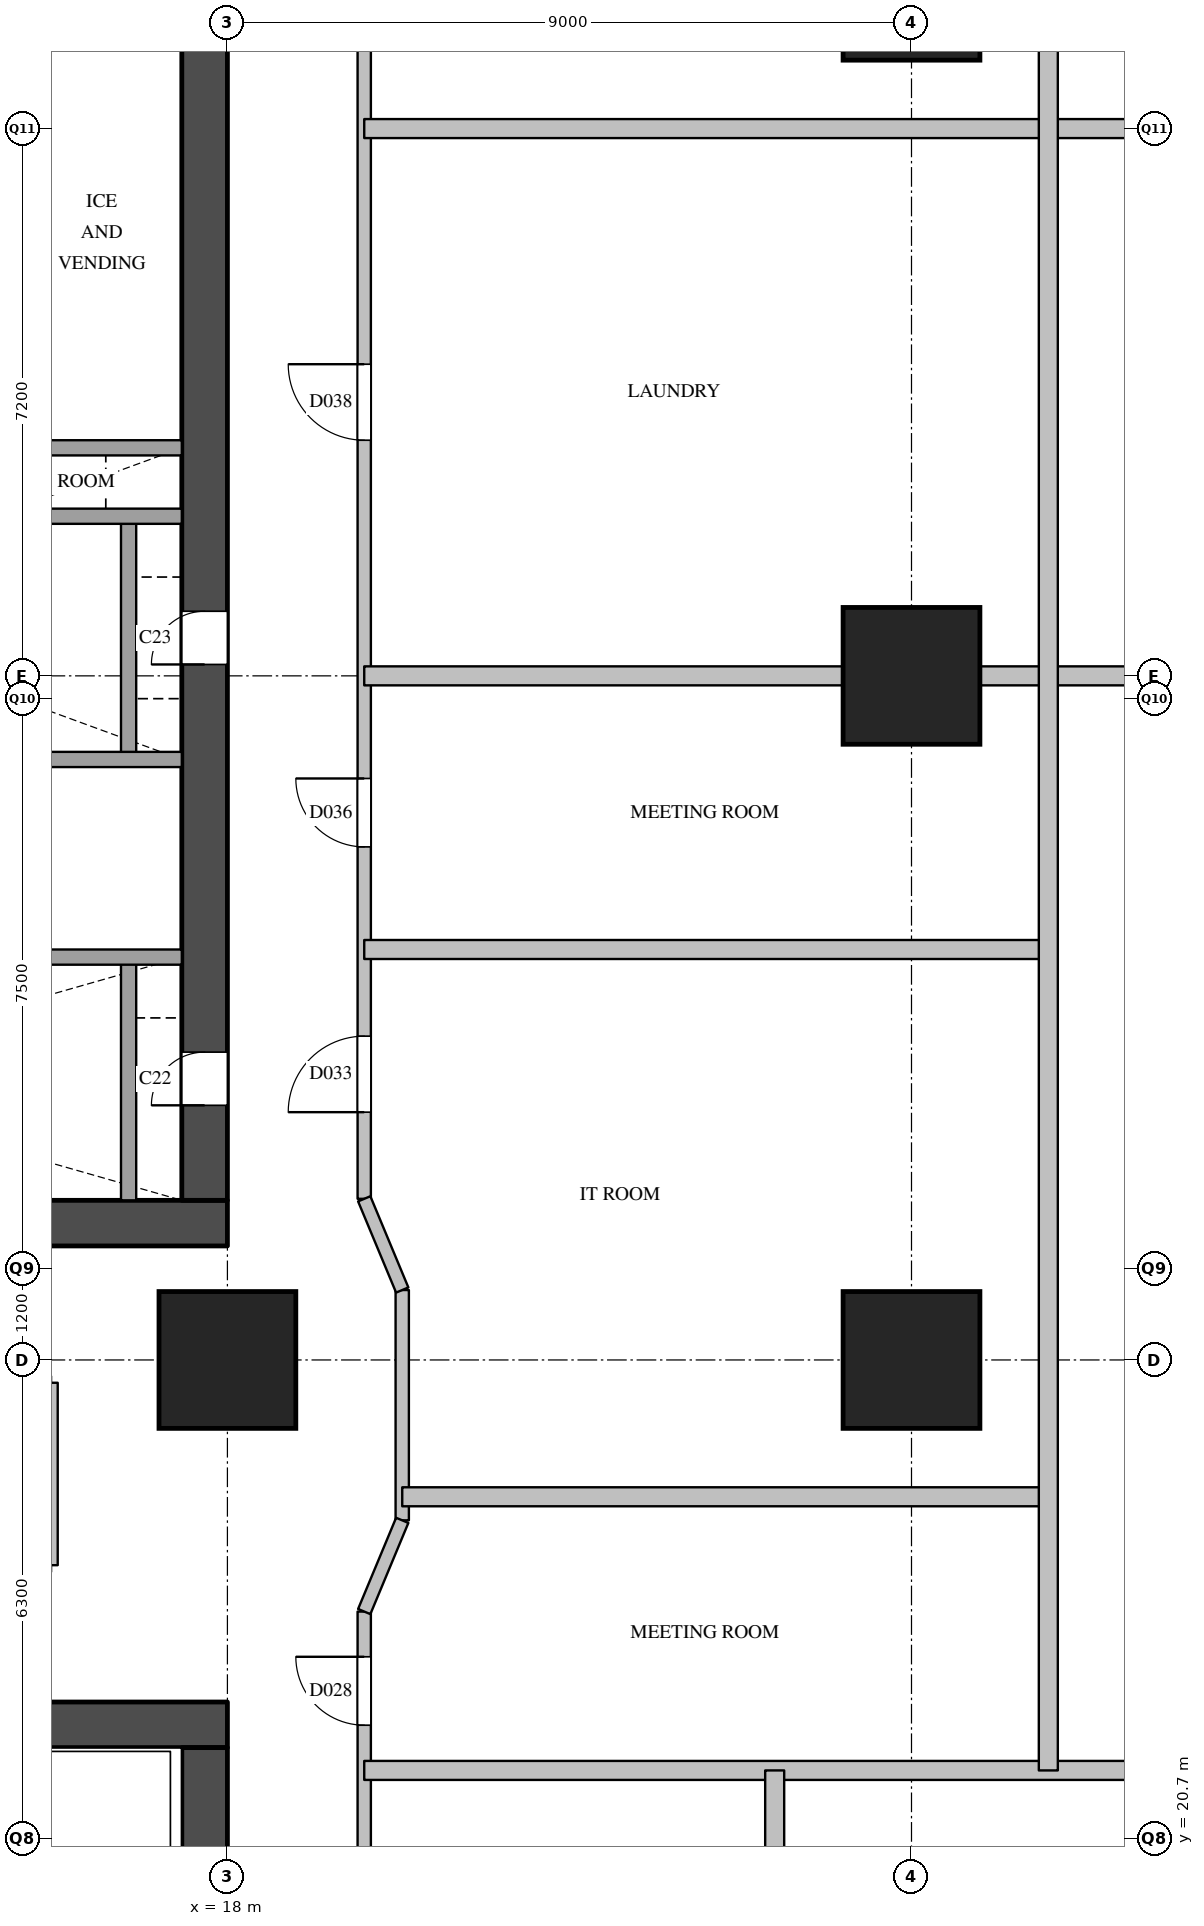
"""IFC4 building model, lengths in metres.
Left out: names, types, materials, properties, quantities, classifications, styles, units other than length and angle.
Written with IfcOpenShell. Run it as: python <this file> out.ifc"""

import sys

from ifc_helpers import new_model, si_unit, direction, frame, frame_2d, origin, origin_2d, place, context, subcontext, project, spatial, rectangle, extrude, element, fill, save


model = new_model("IFC4")
c1 = context("Model", 3, precision=1e-05, world=origin(), true_north=direction((0.0, 1.0)))
c2 = subcontext(c1, "Body", "Model", "MODEL_VIEW")
j1 = project(units=[si_unit("LENGTHUNIT", "METRE"), si_unit("PLANEANGLEUNIT", "RADIAN")], contexts=[c1])
p1 = place(None, origin())
s1 = spatial("IfcSite", under=j1, at=p1, CompositionType="ELEMENT")
p2 = place(p1, origin())
s2 = spatial("IfcBuilding", under=s1, at=p2, CompositionType="ELEMENT")
p3 = place(p2, frame((0.0, 0.0, 57.6)))
s3 = spatial("IfcBuildingStorey", under=s2, at=p3, CompositionType="ELEMENT", Elevation=57.6)
for number, where, z_axis, x_axis in (
    (1, (18.0, 27.0, 0.0), (0.0, 0.0, 1.0), (1.0, 0.0, 0.0)),
    (2, (27.0, 27.0, 0.0), (0.0, 0.0, 1.0), (1.0, 0.0, 0.0)),
    (3, (27.0, 36.0, 0.0), (0.0, 0.0, 1.0), (1.0, 0.0, 0.0)),
    (4, (27.0, 45.0, 0.0), (0.0, 0.0, 1.0), (1.0, 0.0, 0.0)),
):
    element("IfcColumn", number, at=place(p3, frame(where, z_axis=z_axis, x_axis=x_axis)), inside=s3, PredefinedType="COLUMN", context=c2, shape_type="SweptSolid", body=[
        extrude(rectangle(XDim=1.8, YDim=1.8, at=origin_2d()), origin(), (0.0, 0.0, 1.0), 3.8),
    ])
p4 = place(p3, frame((5.6, 28.8, 0.0), z_axis=(0.0, 0.0, 1.0), x_axis=(1.0, 0.0, 0.0)))
e5 = element("IfcWall", 5, at=p4, inside=s3, PredefinedType="SHEAR", context=c2, shape_type="SweptSolid", body=[
    extrude(rectangle(XDim=12.4, YDim=0.6, at=frame_2d((6.2, 0.0))), origin(), (0.0, 0.0, 1.0), 3.5),
])
p5 = place(p4, frame((1.05, 0.0, 0.0)))
e6 = element("IfcOpeningElement", 6, at=p5, cuts=e5, PredefinedType="OPENING", context=c2, shape_type="SweptSolid", body=[
    extrude(rectangle(XDim=1.2, YDim=2.1, at=frame_2d((0.6, 1.05))), frame((0.0, 0.31, 0.0), z_axis=(0.0, -1.0, 0.0), x_axis=(1.0, 0.0, 0.0)), (0.0, 0.0, 1.0), 0.62),
])
p6 = place(p4, frame((5.25, 0.0, 0.0)))
e7 = element("IfcOpeningElement", 7, at=p6, cuts=e5, PredefinedType="OPENING", context=c2, shape_type="SweptSolid", body=[
    extrude(rectangle(XDim=1.2, YDim=2.1, at=frame_2d((0.6, 1.05))), frame((0.0, 0.31, 0.0), z_axis=(0.0, -1.0, 0.0), x_axis=(1.0, 0.0, 0.0)), (0.0, 0.0, 1.0), 0.62),
])
p7 = place(p4, frame((7.35, 0.0, 0.0)))
e8 = element("IfcOpeningElement", 8, at=p7, cuts=e5, PredefinedType="OPENING", context=c2, shape_type="SweptSolid", body=[
    extrude(rectangle(XDim=1.2, YDim=2.1, at=frame_2d((0.6, 1.05))), frame((0.0, 0.31, 0.0), z_axis=(0.0, -1.0, 0.0), x_axis=(1.0, 0.0, 0.0)), (0.0, 0.0, 1.0), 0.62),
])
p8 = place(p3, frame((17.7, 29.1, 0.0), z_axis=(0.0, 0.0, 1.0), x_axis=(0.0, 1.0, 0.0)))
e9 = element("IfcWall", 9, at=p8, inside=s3, PredefinedType="SHEAR", context=c2, shape_type="SweptSolid", body=[
    extrude(rectangle(XDim=20.3, YDim=0.6, at=frame_2d((10.15, 0.0))), origin(), (0.0, 0.0, 1.0), 3.5),
])
p9 = place(p8, frame((1.25, 0.0, 0.0)))
e10 = element("IfcOpeningElement", 10, at=p9, cuts=e9, PredefinedType="OPENING", context=c2, shape_type="SweptSolid", body=[
    extrude(rectangle(XDim=0.7, YDim=2.1, at=frame_2d((0.35, 1.05))), frame((0.0, 0.31, 0.0), z_axis=(0.0, -1.0, 0.0), x_axis=(1.0, 0.0, 0.0)), (0.0, 0.0, 1.0), 0.62),
])
p10 = place(p8, frame((7.05, 0.0, 0.0)))
e11 = element("IfcOpeningElement", 11, at=p10, cuts=e9, PredefinedType="OPENING", context=c2, shape_type="SweptSolid", body=[
    extrude(rectangle(XDim=0.7, YDim=2.1, at=frame_2d((0.35, 1.05))), frame((0.0, 0.31, 0.0), z_axis=(0.0, -1.0, 0.0), x_axis=(1.0, 0.0, 0.0)), (0.0, 0.0, 1.0), 0.62),
])
p11 = place(p3, frame((16.7, 29.1, 0.0), z_axis=(0.0, 0.0, 1.0), x_axis=(0.0, 1.0, 0.0)))
e12 = element("IfcWall", 12, at=p11, inside=s3, PredefinedType="SOLIDWALL", context=c2, shape_type="SweptSolid", body=[
    extrude(rectangle(XDim=3.2, YDim=0.2, at=frame_2d((1.6, 0.0))), origin(), (0.0, 0.0, 1.0), 3.5),
])
p12 = place(p3, frame((16.7, 34.9, 0.0), z_axis=(0.0, 0.0, 1.0), x_axis=(0.0, 1.0, 0.0)))
e13 = element("IfcWall", 13, at=p12, inside=s3, PredefinedType="SOLIDWALL", context=c2, shape_type="SweptSolid", body=[
    extrude(rectangle(XDim=3.2, YDim=0.2, at=frame_2d((1.6, 0.0))), origin(), (0.0, 0.0, 1.0), 3.5),
])
p13 = place(p3, frame((6.2, 32.3, 0.0), z_axis=(0.0, 0.0, 1.0), x_axis=(1.0, 0.0, 0.0)))
e14 = element("IfcWall", 14, at=p13, inside=s3, PredefinedType="SOLIDWALL", context=c2, shape_type="SweptSolid", body=[
    extrude(rectangle(XDim=11.2, YDim=0.2, at=frame_2d((5.6, 0.0))), origin(), (0.0, 0.0, 1.0), 3.5),
])
p14 = place(p13, frame((2.55, 0.0, 0.0)))
e15 = element("IfcOpeningElement", 15, at=p14, cuts=e14, PredefinedType="OPENING", context=c2, shape_type="SweptSolid", body=[
    extrude(rectangle(XDim=1.2, YDim=2.1, at=frame_2d((0.6, 1.05))), frame((0.0, 0.11, 0.0), z_axis=(0.0, -1.0, 0.0), x_axis=(1.0, 0.0, 0.0)), (0.0, 0.0, 1.0), 0.22),
])
p15 = place(p3, frame((6.2, 34.9, 0.0), z_axis=(0.0, 0.0, 1.0), x_axis=(1.0, 0.0, 0.0)))
e16 = element("IfcWall", 16, at=p15, inside=s3, PredefinedType="SOLIDWALL", context=c2, shape_type="SweptSolid", body=[
    extrude(rectangle(XDim=11.2, YDim=0.2, at=frame_2d((5.6, 0.0))), origin(), (0.0, 0.0, 1.0), 3.5),
])
p16 = place(p3, frame((6.2, 38.1, 0.0), z_axis=(0.0, 0.0, 1.0), x_axis=(1.0, 0.0, 0.0)))
e17 = element("IfcWall", 17, at=p16, inside=s3, PredefinedType="SOLIDWALL", context=c2, shape_type="SweptSolid", body=[
    extrude(rectangle(XDim=11.2, YDim=0.2, at=frame_2d((5.6, 0.0))), origin(), (0.0, 0.0, 1.0), 3.5),
])
p17 = place(p16, frame((0.45, 0.0, 0.0)))
e18 = element("IfcOpeningElement", 18, at=p17, cuts=e17, PredefinedType="OPENING", context=c2, shape_type="SweptSolid", body=[
    extrude(rectangle(XDim=1.2, YDim=2.1, at=frame_2d((0.6, 1.05))), frame((0.0, 0.11, 0.0), z_axis=(0.0, -1.0, 0.0), x_axis=(1.0, 0.0, 0.0)), (0.0, 0.0, 1.0), 0.22),
])
p18 = place(p16, frame((2.55, 0.0, 0.0)))
e19 = element("IfcOpeningElement", 19, at=p18, cuts=e17, PredefinedType="OPENING", context=c2, shape_type="SweptSolid", body=[
    extrude(rectangle(XDim=1.2, YDim=2.1, at=frame_2d((0.6, 1.05))), frame((0.0, 0.11, 0.0), z_axis=(0.0, -1.0, 0.0), x_axis=(1.0, 0.0, 0.0)), (0.0, 0.0, 1.0), 0.22),
])
p19 = place(p16, frame((4.65, 0.0, 0.0)))
e20 = element("IfcOpeningElement", 20, at=p19, cuts=e17, PredefinedType="OPENING", context=c2, shape_type="SweptSolid", body=[
    extrude(rectangle(XDim=1.2, YDim=2.1, at=frame_2d((0.6, 1.05))), frame((0.0, 0.11, 0.0), z_axis=(0.0, -1.0, 0.0), x_axis=(1.0, 0.0, 0.0)), (0.0, 0.0, 1.0), 0.22),
])
p20 = place(p16, frame((6.75, 0.0, 0.0)))
e21 = element("IfcOpeningElement", 21, at=p20, cuts=e17, PredefinedType="OPENING", context=c2, shape_type="SweptSolid", body=[
    extrude(rectangle(XDim=1.2, YDim=2.1, at=frame_2d((0.6, 1.05))), frame((0.0, 0.11, 0.0), z_axis=(0.0, -1.0, 0.0), x_axis=(1.0, 0.0, 0.0)), (0.0, 0.0, 1.0), 0.22),
])
p21 = place(p3, frame((12.5, 39.0, 0.0), z_axis=(0.0, 0.0, 1.0), x_axis=(1.0, 0.0, 0.0)))
e22 = element("IfcWall", 22, at=p21, inside=s3, PredefinedType="SOLIDWALL", context=c2, shape_type="SweptSolid", body=[
    extrude(rectangle(XDim=4.9, YDim=0.2, at=frame_2d((2.45, 0.0))), origin(), (0.0, 0.0, 1.0), 3.5),
])
p22 = place(p3, frame((9.0, 22.2, 0.0), z_axis=(0.0, 0.0, 1.0), x_axis=(1.0, 0.0, 0.0)))
e23 = element("IfcWall", 23, at=p22, inside=s3, PredefinedType="SHEAR", context=c2, shape_type="SweptSolid", body=[
    extrude(rectangle(XDim=9.0, YDim=0.6, at=frame_2d((4.5, 0.0))), origin(), (0.0, 0.0, 1.0), 3.5),
])
p23 = place(p3, frame((17.7, 9.6, 0.0), z_axis=(0.0, 0.0, 1.0), x_axis=(0.0, 1.0, 0.0)))
e24 = element("IfcWall", 24, at=p23, inside=s3, PredefinedType="SHEAR", context=c2, shape_type="SweptSolid", body=[
    extrude(rectangle(XDim=12.3, YDim=0.6, at=frame_2d((6.15, 0.0))), origin(), (0.0, 0.0, 1.0), 3.5),
])
p24 = place(p23, frame((0.525, 0.0, 0.0)))
e25 = element("IfcOpeningElement", 25, at=p24, cuts=e24, PredefinedType="OPENING", context=c2, shape_type="SweptSolid", body=[
    extrude(rectangle(XDim=1.2, YDim=2.1, at=frame_2d((0.6, 1.05))), frame((0.0, 0.31, 0.0), z_axis=(0.0, -1.0, 0.0), x_axis=(1.0, 0.0, 0.0)), (0.0, 0.0, 1.0), 0.62),
])
p25 = place(p3, frame((15.68, 24.3, 0.0), z_axis=(0.0, 0.0, 1.0), x_axis=(0.0, 1.0, 0.0)))
e26 = element("IfcWall", 26, at=p25, inside=s3, PredefinedType="PARTITIONING", context=c2, shape_type="SweptSolid", body=[
    extrude(rectangle(XDim=2.4, YDim=0.175, at=frame_2d((1.2, 0.0))), origin(), (0.0, 0.0, 1.0), 2.5),
])
p26 = place(p3, frame((19.8, 7.2, 0.0), z_axis=(0.0, 0.0, 1.0), x_axis=(0.0, 1.0, 0.0)))
e27 = element("IfcWall", 27, at=p26, inside=s3, PredefinedType="PARTITIONING", context=c2, shape_type="SweptSolid", body=[
    extrude(rectangle(XDim=16.49, YDim=0.175, at=frame_2d((8.245, 0.0))), origin(), (0.0, 0.0, 1.0), 3.5),
])
p27 = place(p26, frame((1.35, 0.0, 0.0)))
e28 = element("IfcOpeningElement", 28, at=p27, cuts=e27, PredefinedType="OPENING", context=c2, shape_type="SweptSolid", body=[
    extrude(rectangle(XDim=0.9, YDim=2.1, at=frame_2d((0.45, 1.05))), frame((0.0, 0.097, 0.0), z_axis=(0.0, -1.0, 0.0), x_axis=(1.0, 0.0, 0.0)), (0.0, 0.0, 1.0), 0.195),
])
p28 = place(p26, frame((8.5, 0.0, 0.0)))
e29 = element("IfcOpeningElement", 29, at=p28, cuts=e27, PredefinedType="OPENING", context=c2, shape_type="SweptSolid", body=[
    extrude(rectangle(XDim=1.0, YDim=2.1, at=frame_2d((0.5, 1.05))), frame((0.0, 0.097, 0.0), z_axis=(0.0, -1.0, 0.0), x_axis=(1.0, 0.0, 0.0)), (0.0, 0.0, 1.0), 0.195),
])
p29 = place(p26, frame((14.995, 0.0, 0.0)))
e30 = element("IfcOpeningElement", 30, at=p29, cuts=e27, PredefinedType="OPENING", context=c2, shape_type="SweptSolid", body=[
    extrude(rectangle(XDim=0.9, YDim=2.1, at=frame_2d((0.45, 1.05))), frame((0.0, 0.097, 0.0), z_axis=(0.0, -1.0, 0.0), x_axis=(1.0, 0.0, 0.0)), (0.0, 0.0, 1.0), 0.195),
])
p30 = place(p3, frame((19.8, 29.12, 0.0), z_axis=(0.0, 0.0, 1.0), x_axis=(0.0, 1.0, 0.0)))
e31 = element("IfcWall", 31, at=p30, inside=s3, PredefinedType="PARTITIONING", context=c2, shape_type="SweptSolid", body=[
    extrude(rectangle(XDim=22.68, YDim=0.175, at=frame_2d((11.34, 0.0))), origin(), (0.0, 0.0, 1.0), 3.5),
])
p31 = place(p30, frame((1.14, 0.0, 0.0)))
e32 = element("IfcOpeningElement", 32, at=p31, cuts=e31, PredefinedType="OPENING", context=c2, shape_type="SweptSolid", body=[
    extrude(rectangle(XDim=1.0, YDim=2.1, at=frame_2d((0.5, 1.05))), frame((0.0, 0.097, 0.0), z_axis=(0.0, -1.0, 0.0), x_axis=(1.0, 0.0, 0.0)), (0.0, 0.0, 1.0), 0.195),
])
p32 = place(p30, frame((4.63, 0.0, 0.0)))
e33 = element("IfcOpeningElement", 33, at=p32, cuts=e31, PredefinedType="OPENING", context=c2, shape_type="SweptSolid", body=[
    extrude(rectangle(XDim=0.9, YDim=2.1, at=frame_2d((0.45, 1.05))), frame((0.0, 0.097, 0.0), z_axis=(0.0, -1.0, 0.0), x_axis=(1.0, 0.0, 0.0)), (0.0, 0.0, 1.0), 0.195),
])
p33 = place(p30, frame((9.98, 0.0, 0.0)))
e34 = element("IfcOpeningElement", 34, at=p33, cuts=e31, PredefinedType="OPENING", context=c2, shape_type="SweptSolid", body=[
    extrude(rectangle(XDim=1.0, YDim=2.1, at=frame_2d((0.5, 1.05))), frame((0.0, 0.097, 0.0), z_axis=(0.0, -1.0, 0.0), x_axis=(1.0, 0.0, 0.0)), (0.0, 0.0, 1.0), 0.195),
])
p34 = place(p30, frame((17.93, 0.0, 0.0)))
e35 = element("IfcOpeningElement", 35, at=p34, cuts=e31, PredefinedType="OPENING", context=c2, shape_type="SweptSolid", body=[
    extrude(rectangle(XDim=0.9, YDim=2.1, at=frame_2d((0.45, 1.05))), frame((0.0, 0.097, 0.0), z_axis=(0.0, -1.0, 0.0), x_axis=(1.0, 0.0, 0.0)), (0.0, 0.0, 1.0), 0.195),
])
p35 = place(p3, frame((20.3, 24.89, 0.0), z_axis=(0.0, 0.0, 1.0), x_axis=(0.0, 1.0, 0.0)))
e36 = element("IfcWall", 36, at=p35, inside=s3, PredefinedType="PARTITIONING", context=c2, shape_type="SweptSolid", body=[
    extrude(rectangle(XDim=3.03, YDim=0.175, at=frame_2d((1.515, 0.0))), origin(), (0.0, 0.0, 1.0), 2.5),
])
p36 = place(p3, frame((19.8, 21.6, 0.0), z_axis=(0.0, 0.0, 1.0), x_axis=(1.0, 0.0, 0.0)))
e37 = element("IfcWall", 37, at=p36, inside=s3, PredefinedType="PARTITIONING", context=c2, shape_type="SweptSolid", body=[
    extrude(rectangle(XDim=14.4, YDim=0.25, at=frame_2d((7.2, 0.0))), origin(), (0.0, 0.0, 1.0), 2.5),
])
p37 = place(p3, frame((20.3, 25.2, 0.0), z_axis=(0.0, 0.0, 1.0), x_axis=(1.0, 0.0, 0.0)))
e38 = element("IfcWall", 38, at=p37, inside=s3, PredefinedType="PARTITIONING", context=c2, shape_type="SweptSolid", body=[
    extrude(rectangle(XDim=8.5, YDim=0.25, at=frame_2d((4.25, 0.0))), origin(), (0.0, 0.0, 1.0), 2.5),
])
p38 = place(p3, frame((19.8, 32.4, 0.0), z_axis=(0.0, 0.0, 1.0), x_axis=(1.0, 0.0, 0.0)))
e39 = element("IfcWall", 39, at=p38, inside=s3, PredefinedType="PARTITIONING", context=c2, shape_type="SweptSolid", body=[
    extrude(rectangle(XDim=9.0, YDim=0.25, at=frame_2d((4.5, 0.0))), origin(), (0.0, 0.0, 1.0), 2.5),
])
p39 = place(p3, frame((19.8, 36.0, 0.0), z_axis=(0.0, 0.0, 1.0), x_axis=(1.0, 0.0, 0.0)))
e40 = element("IfcWall", 40, at=p39, inside=s3, PredefinedType="PARTITIONING", context=c2, shape_type="SweptSolid", body=[
    extrude(rectangle(XDim=14.4, YDim=0.25, at=frame_2d((7.2, 0.0))), origin(), (0.0, 0.0, 1.0), 3.5),
])
p40 = place(p3, frame((19.8, 43.2, 0.0), z_axis=(0.0, 0.0, 1.0), x_axis=(1.0, 0.0, 0.0)))
e41 = element("IfcWall", 41, at=p40, inside=s3, PredefinedType="PARTITIONING", context=c2, shape_type="SweptSolid", body=[
    extrude(rectangle(XDim=14.4, YDim=0.25, at=frame_2d((7.2, 0.0))), origin(), (0.0, 0.0, 1.0), 2.5),
])
p41 = place(p3, frame((25.2, 0.0, 0.0), z_axis=(0.0, 0.0, 1.0), x_axis=(0.0, 1.0, 0.0)))
e42 = element("IfcWall", 42, at=p41, inside=s3, PredefinedType="PARTITIONING", context=c2, shape_type="SweptSolid", body=[
    extrude(rectangle(XDim=21.6, YDim=0.25, at=frame_2d((10.8, 0.0))), origin(), (0.0, 0.0, 1.0), 2.5),
])
p42 = place(p3, frame((28.8, 21.6, 0.0), z_axis=(0.0, 0.0, 1.0), x_axis=(0.0, 1.0, 0.0)))
e43 = element("IfcWall", 43, at=p42, inside=s3, PredefinedType="PARTITIONING", context=c2, shape_type="SweptSolid", body=[
    extrude(rectangle(XDim=32.4, YDim=0.25, at=frame_2d((16.2, 0.0))), origin(), (0.0, 0.0, 1.0), 2.5),
])
p43 = place(p3, frame((20.3, 24.89, 0.0), z_axis=(0.0, 0.0, 1.0), x_axis=(-0.384628719983, -0.923071366561, 0.0)))
e44 = element("IfcWall", 44, at=p43, inside=s3, PredefinedType="PARTITIONING", context=c2, shape_type="SweptSolid", body=[
    extrude(rectangle(XDim=1.3, YDim=0.175, at=frame_2d((0.65, 0.0))), origin(), (0.0, 0.0, 1.0), 3.5),
])
p44 = place(p3, frame((19.8, 29.12, 0.0), z_axis=(0.0, 0.0, 1.0), x_axis=(0.384562051588, -0.923099143363, 0.0)))
e45 = element("IfcWall", 45, at=p44, inside=s3, PredefinedType="PARTITIONING", context=c2, shape_type="SweptSolid", body=[
    extrude(rectangle(XDim=1.3, YDim=0.175, at=frame_2d((0.65, 0.0))), origin(), (0.0, 0.0, 1.0), 3.5),
])
p45 = place(p9, origin())
e46 = element("IfcDoor", 46, at=p45, inside=s3, OperationType="SINGLE_SWING_LEFT", PredefinedType="DOOR", context=c2, shape_type="SweptSolid", body=[
    extrude(rectangle(XDim=0.7, YDim=2.1, at=frame_2d((0.35, 1.05))), frame((0.0, 0.025, 0.0), z_axis=(0.0, -1.0, 0.0), x_axis=(1.0, 0.0, 0.0)), (0.0, 0.0, 1.0), 0.05),
])
fill(e10, e46)
p46 = place(p10, origin())
e47 = element("IfcDoor", 47, at=p46, inside=s3, OperationType="SINGLE_SWING_LEFT", PredefinedType="DOOR", context=c2, shape_type="SweptSolid", body=[
    extrude(rectangle(XDim=0.7, YDim=2.1, at=frame_2d((0.35, 1.05))), frame((0.0, 0.025, 0.0), z_axis=(0.0, -1.0, 0.0), x_axis=(1.0, 0.0, 0.0)), (0.0, 0.0, 1.0), 0.05),
])
fill(e11, e47)
p47 = place(p29, origin())
e48 = element("IfcDoor", 48, at=p47, inside=s3, OperationType="SINGLE_SWING_RIGHT", PredefinedType="DOOR", context=c2, shape_type="SweptSolid", body=[
    extrude(rectangle(XDim=0.9, YDim=2.1, at=frame_2d((0.45, 1.05))), frame((0.0, 0.025, 0.0), z_axis=(0.0, -1.0, 0.0), x_axis=(1.0, 0.0, 0.0)), (0.0, 0.0, 1.0), 0.05),
])
fill(e30, e48)
p48 = place(p31, origin())
e49 = element("IfcDoor", 49, at=p48, inside=s3, OperationType="SINGLE_SWING_LEFT", PredefinedType="DOOR", context=c2, shape_type="SweptSolid", body=[
    extrude(rectangle(XDim=1.0, YDim=2.1, at=frame_2d((0.5, 1.05))), frame((0.0, 0.025, 0.0), z_axis=(0.0, -1.0, 0.0), x_axis=(1.0, 0.0, 0.0)), (0.0, 0.0, 1.0), 0.05),
])
fill(e32, e49)
p49 = place(p32, origin())
e50 = element("IfcDoor", 50, at=p49, inside=s3, OperationType="SINGLE_SWING_RIGHT", PredefinedType="DOOR", context=c2, shape_type="SweptSolid", body=[
    extrude(rectangle(XDim=0.9, YDim=2.1, at=frame_2d((0.45, 1.05))), frame((0.0, 0.025, 0.0), z_axis=(0.0, -1.0, 0.0), x_axis=(1.0, 0.0, 0.0)), (0.0, 0.0, 1.0), 0.05),
])
fill(e33, e50)
p50 = place(p33, origin())
e51 = element("IfcDoor", 51, at=p50, inside=s3, OperationType="SINGLE_SWING_RIGHT", PredefinedType="DOOR", context=c2, shape_type="SweptSolid", body=[
    extrude(rectangle(XDim=1.0, YDim=2.1, at=frame_2d((0.5, 1.05))), frame((0.0, 0.025, 0.0), z_axis=(0.0, -1.0, 0.0), x_axis=(1.0, 0.0, 0.0)), (0.0, 0.0, 1.0), 0.05),
])
fill(e34, e51)
save(model, sys.argv[1])
